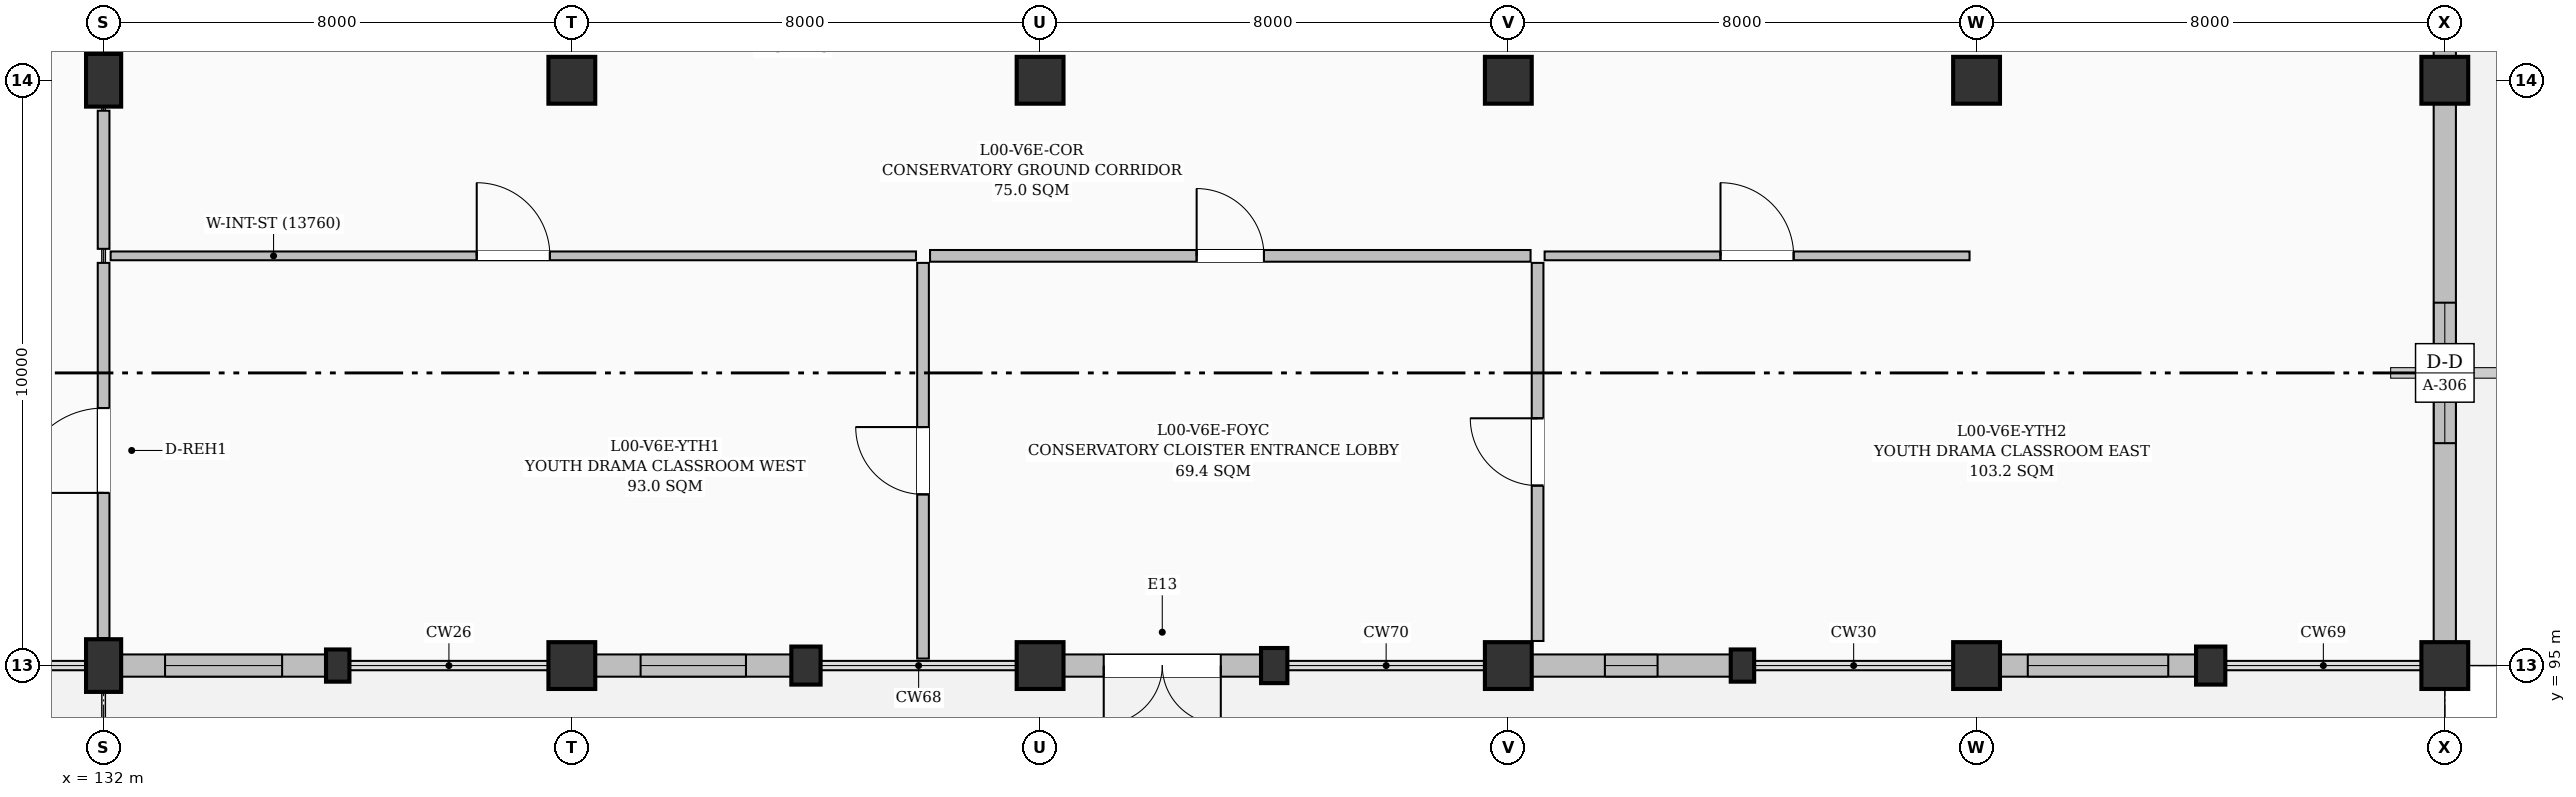
"""IFC4 building model, lengths in metres.
Left out: names, types, materials, properties, quantities, classifications, styles, units other than length and angle.
Written with IfcOpenShell. Run it as: python <this file> out.ifc"""

import sys

from ifc_helpers import new_model, si_unit, direction, frame, frame_2d, origin, origin_2d, place, context, subcontext, project, spatial, rectangle, extrude, element, fill, save


model = new_model("IFC4")
c1 = context("Model", 3, precision=1e-05, world=origin(), true_north=direction((0.0, 1.0)))
c2 = subcontext(c1, "Body", "Model", "MODEL_VIEW")
j1 = project(units=[si_unit("LENGTHUNIT", "METRE"), si_unit("PLANEANGLEUNIT", "RADIAN")], contexts=[c1])
p1 = place(None, origin())
s1 = spatial("IfcSite", under=j1, at=p1, CompositionType="ELEMENT")
p2 = place(p1, origin())
s2 = spatial("IfcBuilding", under=s1, at=p2, CompositionType="ELEMENT")
p3 = place(p2, origin())
s3 = spatial("IfcBuildingStorey", under=s2, at=p3, CompositionType="ELEMENT", Elevation=0.0)
for number, where, z_axis, x_axis in (
    (1, (132.0, 95.0, 0.0), (0.0, 0.0, 1.0), (1.0, 0.0, 0.0)),
    (2, (132.0, 105.0, 0.0), (0.0, 0.0, 1.0), (1.0, 0.0, 0.0)),
):
    element("IfcColumn", number, at=place(p3, frame(where, z_axis=z_axis, x_axis=x_axis)), inside=s3, PredefinedType="COLUMN", context=c2, shape_type="SweptSolid", body=[
        extrude(rectangle(XDim=0.6, YDim=0.9, at=origin_2d()), origin(), (0.0, 0.0, 1.0), 4.8),
    ])
p4 = place(p3, frame((136.0, 95.0, 0.0), z_axis=(0.0, 0.0, 1.0), x_axis=(1.0, 0.0, 0.0)))
e3 = element("IfcColumn", 3, at=p4, inside=s3, PredefinedType="PILASTER", context=c2, shape_type="SweptSolid", body=[
    extrude(rectangle(XDim=0.4, YDim=0.55, at=origin_2d()), origin(), (0.0, 0.0, 1.0), 4.8),
])
for number, where, z_axis, x_axis in (
    (4, (140.0, 95.0, 0.0), (0.0, 0.0, 1.0), (1.0, 0.0, 0.0)),
    (5, (140.0, 105.0, 0.0), (0.0, 0.0, 1.0), (1.0, 0.0, 0.0)),
):
    element("IfcColumn", number, at=place(p3, frame(where, z_axis=z_axis, x_axis=x_axis)), inside=s3, PredefinedType="COLUMN", context=c2, shape_type="SweptSolid", body=[
        extrude(rectangle(XDim=0.8, YDim=0.8, at=origin_2d()), origin(), (0.0, 0.0, 1.0), 4.8),
    ])
p5 = place(p3, frame((144.0, 95.0, 0.0), z_axis=(0.0, 0.0, 1.0), x_axis=(1.0, 0.0, 0.0)))
e6 = element("IfcColumn", 6, at=p5, inside=s3, PredefinedType="PILASTER", context=c2, shape_type="SweptSolid", body=[
    extrude(rectangle(XDim=0.5, YDim=0.65, at=origin_2d()), origin(), (0.0, 0.0, 1.0), 4.8),
])
for number, where, z_axis, x_axis in (
    (7, (148.0, 95.0, 0.0), (0.0, 0.0, 1.0), (1.0, 0.0, 0.0)),
    (8, (148.0, 105.0, 0.0), (0.0, 0.0, 1.0), (1.0, 0.0, 0.0)),
):
    element("IfcColumn", number, at=place(p3, frame(where, z_axis=z_axis, x_axis=x_axis)), inside=s3, PredefinedType="COLUMN", context=c2, shape_type="SweptSolid", body=[
        extrude(rectangle(XDim=0.8, YDim=0.8, at=origin_2d()), origin(), (0.0, 0.0, 1.0), 4.8),
    ])
p6 = place(p3, frame((152.0, 95.0, 0.0), z_axis=(0.0, 0.0, 1.0), x_axis=(1.0, 0.0, 0.0)))
e9 = element("IfcColumn", 9, at=p6, inside=s3, PredefinedType="PILASTER", context=c2, shape_type="SweptSolid", body=[
    extrude(rectangle(XDim=0.45, YDim=0.6, at=origin_2d()), origin(), (0.0, 0.0, 1.0), 4.8),
])
for number, where, z_axis, x_axis in (
    (10, (156.0, 95.0, 0.0), (0.0, 0.0, 1.0), (1.0, 0.0, 0.0)),
    (11, (156.0, 105.0, 0.0), (0.0, 0.0, 1.0), (1.0, 0.0, 0.0)),
):
    element("IfcColumn", number, at=place(p3, frame(where, z_axis=z_axis, x_axis=x_axis)), inside=s3, PredefinedType="COLUMN", context=c2, shape_type="SweptSolid", body=[
        extrude(rectangle(XDim=0.8, YDim=0.8, at=origin_2d()), origin(), (0.0, 0.0, 1.0), 4.8),
    ])
p7 = place(p3, frame((160.0, 95.0, 0.0), z_axis=(0.0, 0.0, 1.0), x_axis=(1.0, 0.0, 0.0)))
e12 = element("IfcColumn", 12, at=p7, inside=s3, PredefinedType="PILASTER", context=c2, shape_type="SweptSolid", body=[
    extrude(rectangle(XDim=0.4, YDim=0.55, at=origin_2d()), origin(), (0.0, 0.0, 1.0), 4.8),
])
for number, where, z_axis, x_axis in (
    (13, (164.0, 95.0, 0.0), (0.0, 0.0, 1.0), (1.0, 0.0, 0.0)),
    (14, (164.0, 105.0, 0.0), (0.0, 0.0, 1.0), (1.0, 0.0, 0.0)),
):
    element("IfcColumn", number, at=place(p3, frame(where, z_axis=z_axis, x_axis=x_axis)), inside=s3, PredefinedType="COLUMN", context=c2, shape_type="SweptSolid", body=[
        extrude(rectangle(XDim=0.8, YDim=0.8, at=origin_2d()), origin(), (0.0, 0.0, 1.0), 4.8),
    ])
p8 = place(p3, frame((168.0, 95.0, 0.0), z_axis=(0.0, 0.0, 1.0), x_axis=(1.0, 0.0, 0.0)))
e15 = element("IfcColumn", 15, at=p8, inside=s3, PredefinedType="PILASTER", context=c2, shape_type="SweptSolid", body=[
    extrude(rectangle(XDim=0.5, YDim=0.65, at=origin_2d()), origin(), (0.0, 0.0, 1.0), 4.8),
])
for number, where, z_axis, x_axis in (
    (16, (172.0, 95.0, 0.0), (0.0, 0.0, 1.0), (1.0, 0.0, 0.0)),
    (17, (172.0, 105.0, 0.0), (0.0, 0.0, 1.0), (1.0, 0.0, 0.0)),
):
    element("IfcColumn", number, at=place(p3, frame(where, z_axis=z_axis, x_axis=x_axis)), inside=s3, PredefinedType="COLUMN", context=c2, shape_type="SweptSolid", body=[
        extrude(rectangle(XDim=0.8, YDim=0.8, at=origin_2d()), origin(), (0.0, 0.0, 1.0), 4.8),
    ])
p9 = place(p3, frame((172.0, 114.6, 0.0), z_axis=(0.0, 0.0, 1.0), x_axis=(0.0, -1.0, 0.0)))
e18 = element("IfcWall", 18, at=p9, inside=s3, PredefinedType="SOLIDWALL", context=c2, shape_type="SweptSolid", body=[
    extrude(rectangle(XDim=9.2, YDim=0.38, at=frame_2d((4.6, 0.0))), origin(), (0.0, 0.0, 1.0), 4.335),
])
p10 = place(p9, frame((3.85, 0.0, 0.95)))
e19 = element("IfcOpeningElement", 19, at=p10, cuts=e18, PredefinedType="OPENING", context=c2, shape_type="SweptSolid", body=[
    extrude(rectangle(XDim=1.5, YDim=1.5, at=frame_2d((0.75, 0.75))), frame((0.0, 0.2, 0.0), z_axis=(0.0, -1.0, 0.0), x_axis=(1.0, 0.0, 0.0)), (0.0, 0.0, 1.0), 0.4),
])
p11 = place(p3, frame((172.0, 104.6, 0.0), z_axis=(0.0, 0.0, 1.0), x_axis=(0.0, -1.0, 0.0)))
e20 = element("IfcWall", 20, at=p11, inside=s3, PredefinedType="SOLIDWALL", context=c2, shape_type="SweptSolid", body=[
    extrude(rectangle(XDim=9.2, YDim=0.38, at=frame_2d((4.6, 0.0))), origin(), (0.0, 0.0, 1.0), 4.235),
])
p12 = place(p11, frame((3.4, 0.0, 0.95)))
e21 = element("IfcOpeningElement", 21, at=p12, cuts=e20, PredefinedType="OPENING", context=c2, shape_type="SweptSolid", body=[
    extrude(rectangle(XDim=2.4, YDim=1.5, at=frame_2d((1.2, 0.75))), frame((0.0, 0.2, 0.0), z_axis=(0.0, -1.0, 0.0), x_axis=(1.0, 0.0, 0.0)), (0.0, 0.0, 1.0), 0.4),
])
p13 = place(p3, frame((167.75, 95.0, 0.0), z_axis=(0.0, 0.0, 1.0), x_axis=(-1.0, 0.0, 0.0)))
e22 = element("IfcWall", 22, at=p13, inside=s3, PredefinedType="SOLIDWALL", context=c2, shape_type="SweptSolid", body=[
    extrude(rectangle(XDim=3.35, YDim=0.38, at=frame_2d((1.675, 0.0))), origin(), (0.0, 0.0, 1.0), 3.985),
])
p14 = place(p13, frame((0.475, 0.0, 0.95)))
e23 = element("IfcOpeningElement", 23, at=p14, cuts=e22, PredefinedType="OPENING", context=c2, shape_type="SweptSolid", body=[
    extrude(rectangle(XDim=2.4, YDim=1.5, at=frame_2d((1.2, 0.75))), frame((0.0, 0.2, 0.0), z_axis=(0.0, -1.0, 0.0), x_axis=(1.0, 0.0, 0.0)), (0.0, 0.0, 1.0), 0.4),
])
p15 = place(p3, frame((159.8, 95.0, 0.0), z_axis=(0.0, 0.0, 1.0), x_axis=(-1.0, 0.0, 0.0)))
e24 = element("IfcWall", 24, at=p15, inside=s3, PredefinedType="SOLIDWALL", context=c2, shape_type="SweptSolid", body=[
    extrude(rectangle(XDim=3.4, YDim=0.38, at=frame_2d((1.7, 0.0))), origin(), (0.0, 0.0, 1.0), 4.035),
])
p16 = place(p15, frame((1.25, 0.0, 0.95)))
e25 = element("IfcOpeningElement", 25, at=p16, cuts=e24, PredefinedType="OPENING", context=c2, shape_type="SweptSolid", body=[
    extrude(rectangle(XDim=0.9, YDim=1.8, at=frame_2d((0.45, 0.9))), frame((0.0, 0.2, 0.0), z_axis=(0.0, -1.0, 0.0), x_axis=(1.0, 0.0, 0.0)), (0.0, 0.0, 1.0), 0.4),
])
p17 = place(p3, frame((151.775, 95.0, 0.0), z_axis=(0.0, 0.0, 1.0), x_axis=(-1.0, 0.0, 0.0)))
e26 = element("IfcWall", 26, at=p17, inside=s3, PredefinedType="SOLIDWALL", context=c2, shape_type="SweptSolid", body=[
    extrude(rectangle(XDim=3.375, YDim=0.38, at=frame_2d((1.688, 0.0))), origin(), (0.0, 0.0, 1.0), 4.235),
])
p18 = place(p17, frame((0.688, 0.0, 0.0)))
e27 = element("IfcOpeningElement", 27, at=p18, cuts=e26, PredefinedType="OPENING", context=c2, shape_type="SweptSolid", body=[
    extrude(rectangle(XDim=2.0, YDim=2.3, at=frame_2d((1.0, 1.15))), frame((0.0, 0.2, 0.0), z_axis=(0.0, -1.0, 0.0), x_axis=(1.0, 0.0, 0.0)), (0.0, 0.0, 1.0), 0.4),
])
p19 = place(p3, frame((143.75, 95.0, 0.0), z_axis=(0.0, 0.0, 1.0), x_axis=(-1.0, 0.0, 0.0)))
e28 = element("IfcWall", 28, at=p19, inside=s3, PredefinedType="SOLIDWALL", context=c2, shape_type="SweptSolid", body=[
    extrude(rectangle(XDim=3.35, YDim=0.38, at=frame_2d((1.675, 0.0))), origin(), (0.0, 0.0, 1.0), 3.935),
])
p20 = place(p19, frame((0.775, 0.0, 0.95)))
e29 = element("IfcOpeningElement", 29, at=p20, cuts=e28, PredefinedType="OPENING", context=c2, shape_type="SweptSolid", body=[
    extrude(rectangle(XDim=1.8, YDim=1.5, at=frame_2d((0.9, 0.75))), frame((0.0, 0.2, 0.0), z_axis=(0.0, -1.0, 0.0), x_axis=(1.0, 0.0, 0.0)), (0.0, 0.0, 1.0), 0.4),
])
p21 = place(p3, frame((135.8, 95.0, 0.0), z_axis=(0.0, 0.0, 1.0), x_axis=(-1.0, 0.0, 0.0)))
e30 = element("IfcWall", 30, at=p21, inside=s3, PredefinedType="SOLIDWALL", context=c2, shape_type="SweptSolid", body=[
    extrude(rectangle(XDim=3.5, YDim=0.38, at=frame_2d((1.75, 0.0))), origin(), (0.0, 0.0, 1.0), 3.985),
])
p22 = place(p21, frame((0.75, 0.0, 0.95)))
e31 = element("IfcOpeningElement", 31, at=p22, cuts=e30, PredefinedType="OPENING", context=c2, shape_type="SweptSolid", body=[
    extrude(rectangle(XDim=2.0, YDim=1.2, at=frame_2d((1.0, 0.6))), frame((0.0, 0.2, 0.0), z_axis=(0.0, -1.0, 0.0), x_axis=(1.0, 0.0, 0.0)), (0.0, 0.0, 1.0), 0.4),
])
p23 = place(p3, frame((132.0, 95.47, 0.0), z_axis=(0.0, 0.0, 1.0), x_axis=(0.0, 1.0, 0.0)))
e32 = element("IfcWall", 32, at=p23, inside=s3, PredefinedType="PARTITIONING", context=c2, shape_type="SweptSolid", body=[
    extrude(rectangle(XDim=6.41, YDim=0.2, at=frame_2d((3.205, 0.0))), origin(), (0.0, 0.0, 1.0), 4.085),
])
p24 = place(p23, frame((2.48, 0.0, 0.0)))
e33 = element("IfcOpeningElement", 33, at=p24, cuts=e32, PredefinedType="OPENING", context=c2, shape_type="SweptSolid", body=[
    extrude(rectangle(XDim=1.45, YDim=2.25, at=frame_2d((0.725, 1.125))), frame((0.0, 0.11, 0.0), z_axis=(0.0, -1.0, 0.0), x_axis=(1.0, 0.0, 0.0)), (0.0, 0.0, 1.0), 0.22),
])
p25 = place(p3, frame((132.0, 102.12, 0.0), z_axis=(0.0, 0.0, 1.0), x_axis=(0.0, 1.0, 0.0)))
e34 = element("IfcWall", 34, at=p25, inside=s3, PredefinedType="PARTITIONING", context=c2, shape_type="SweptSolid", body=[
    extrude(rectangle(XDim=2.36, YDim=0.2, at=frame_2d((1.18, 0.0))), origin(), (0.0, 0.0, 1.0), 4.085),
])
p26 = place(p3, frame((132.12, 102.0, 0.0), z_axis=(0.0, 0.0, 1.0), x_axis=(1.0, 0.0, 0.0)))
e35 = element("IfcWall", 35, at=p26, inside=s3, PredefinedType="PARTITIONING", context=c2, shape_type="SweptSolid", body=[
    extrude(rectangle(XDim=13.76, YDim=0.15, at=frame_2d((6.88, 0.0))), origin(), (0.0, 0.0, 1.0), 4.175),
])
p27 = place(p26, frame((6.255, 0.0, 0.0)))
e36 = element("IfcOpeningElement", 36, at=p27, cuts=e35, PredefinedType="OPENING", context=c2, shape_type="SweptSolid", body=[
    extrude(rectangle(XDim=1.25, YDim=2.15, at=frame_2d((0.625, 1.075))), frame((0.0, 0.085, 0.0), z_axis=(0.0, -1.0, 0.0), x_axis=(1.0, 0.0, 0.0)), (0.0, 0.0, 1.0), 0.17),
])
p28 = place(p3, frame((146.0, 95.12, 0.0), z_axis=(0.0, 0.0, 1.0), x_axis=(0.0, 1.0, 0.0)))
e37 = element("IfcWall", 37, at=p28, inside=s3, PredefinedType="PARTITIONING", context=c2, shape_type="SweptSolid", body=[
    extrude(rectangle(XDim=6.76, YDim=0.2, at=frame_2d((3.38, 0.0))), origin(), (0.0, 0.0, 1.0), 4.55),
])
p29 = place(p28, frame((2.805, 0.0, 0.0)))
e38 = element("IfcOpeningElement", 38, at=p29, cuts=e37, PredefinedType="OPENING", context=c2, shape_type="SweptSolid", body=[
    extrude(rectangle(XDim=1.15, YDim=2.15, at=frame_2d((0.575, 1.075))), frame((0.0, 0.11, 0.0), z_axis=(0.0, -1.0, 0.0), x_axis=(1.0, 0.0, 0.0)), (0.0, 0.0, 1.0), 0.22),
])
p30 = place(p3, frame((156.62, 102.0, 0.0), z_axis=(0.0, 0.0, 1.0), x_axis=(1.0, 0.0, 0.0)))
e39 = element("IfcWall", 39, at=p30, inside=s3, PredefinedType="PARTITIONING", context=c2, shape_type="SweptSolid", body=[
    extrude(rectangle(XDim=7.26, YDim=0.15, at=frame_2d((3.63, 0.0))), origin(), (0.0, 0.0, 1.0), 4.205),
])
p31 = place(p30, frame((3.005, 0.0, 0.0)))
e40 = element("IfcOpeningElement", 40, at=p31, cuts=e39, PredefinedType="OPENING", context=c2, shape_type="SweptSolid", body=[
    extrude(rectangle(XDim=1.25, YDim=2.15, at=frame_2d((0.625, 1.075))), frame((0.0, 0.085, 0.0), z_axis=(0.0, -1.0, 0.0), x_axis=(1.0, 0.0, 0.0)), (0.0, 0.0, 1.0), 0.17),
])
p32 = place(p3, frame((156.5, 95.42, 0.0), z_axis=(0.0, 0.0, 1.0), x_axis=(0.0, 1.0, 0.0)))
e41 = element("IfcWall", 41, at=p32, inside=s3, PredefinedType="PARTITIONING", context=c2, shape_type="SweptSolid", body=[
    extrude(rectangle(XDim=6.46, YDim=0.2, at=frame_2d((3.23, 0.0))), origin(), (0.0, 0.0, 1.0), 4.55),
])
p33 = place(p32, frame((2.655, 0.0, 0.0)))
e42 = element("IfcOpeningElement", 42, at=p33, cuts=e41, PredefinedType="OPENING", context=c2, shape_type="SweptSolid", body=[
    extrude(rectangle(XDim=1.15, YDim=2.15, at=frame_2d((0.575, 1.075))), frame((0.0, 0.11, 0.0), z_axis=(0.0, -1.0, 0.0), x_axis=(1.0, 0.0, 0.0)), (0.0, 0.0, 1.0), 0.22),
])
p34 = place(p3, frame((146.12, 102.0, 0.0), z_axis=(0.0, 0.0, 1.0), x_axis=(1.0, 0.0, 0.0)))
e43 = element("IfcWall", 43, at=p34, inside=s3, PredefinedType="PARTITIONING", context=c2, shape_type="SweptSolid", body=[
    extrude(rectangle(XDim=10.26, YDim=0.2, at=frame_2d((5.13, 0.0))), origin(), (0.0, 0.0, 1.0), 4.175),
])
p35 = place(p34, frame((4.555, 0.0, 0.0)))
e44 = element("IfcOpeningElement", 44, at=p35, cuts=e43, PredefinedType="OPENING", context=c2, shape_type="SweptSolid", body=[
    extrude(rectangle(XDim=1.15, YDim=2.15, at=frame_2d((0.575, 1.075))), frame((0.0, 0.11, 0.0), z_axis=(0.0, -1.0, 0.0), x_axis=(1.0, 0.0, 0.0)), (0.0, 0.0, 1.0), 0.22),
])
p36 = place(p12, origin())
e45 = element("IfcWindow", 45, at=p36, inside=s3, PartitioningType="TRIPLE_PANEL_VERTICAL", PredefinedType="WINDOW", context=c2, shape_type="SweptSolid", body=[
    extrude(rectangle(XDim=2.4, YDim=1.5, at=frame_2d((1.2, 0.75))), frame((0.0, 0.03, 0.0), z_axis=(0.0, -1.0, 0.0), x_axis=(1.0, 0.0, 0.0)), (0.0, 0.0, 1.0), 0.06),
])
fill(e21, e45)
p37 = place(p14, origin())
e46 = element("IfcWindow", 46, at=p37, inside=s3, PartitioningType="TRIPLE_PANEL_VERTICAL", PredefinedType="WINDOW", context=c2, shape_type="SweptSolid", body=[
    extrude(rectangle(XDim=2.4, YDim=1.5, at=frame_2d((1.2, 0.75))), frame((0.0, 0.03, 0.0), z_axis=(0.0, -1.0, 0.0), x_axis=(1.0, 0.0, 0.0)), (0.0, 0.0, 1.0), 0.06),
])
fill(e23, e46)
p38 = place(p16, origin())
e47 = element("IfcWindow", 47, at=p38, inside=s3, PartitioningType="SINGLE_PANEL", PredefinedType="WINDOW", context=c2, shape_type="SweptSolid", body=[
    extrude(rectangle(XDim=0.9, YDim=1.8, at=frame_2d((0.45, 0.9))), frame((0.0, 0.03, 0.0), z_axis=(0.0, -1.0, 0.0), x_axis=(1.0, 0.0, 0.0)), (0.0, 0.0, 1.0), 0.06),
])
fill(e25, e47)
p39 = place(p18, origin())
e48 = element("IfcDoor", 48, at=p39, inside=s3, OperationType="DOUBLE_DOOR_SINGLE_SWING", PredefinedType="DOOR", context=c2, shape_type="SweptSolid", body=[
    extrude(rectangle(XDim=2.0, YDim=2.3, at=frame_2d((1.0, 1.15))), frame((0.0, 0.025, 0.0), z_axis=(0.0, -1.0, 0.0), x_axis=(1.0, 0.0, 0.0)), (0.0, 0.0, 1.0), 0.05),
])
fill(e27, e48)
p40 = place(p20, origin())
e49 = element("IfcWindow", 49, at=p40, inside=s3, PartitioningType="DOUBLE_PANEL_VERTICAL", PredefinedType="WINDOW", context=c2, shape_type="SweptSolid", body=[
    extrude(rectangle(XDim=1.8, YDim=1.5, at=frame_2d((0.9, 0.75))), frame((0.0, 0.03, 0.0), z_axis=(0.0, -1.0, 0.0), x_axis=(1.0, 0.0, 0.0)), (0.0, 0.0, 1.0), 0.06),
])
fill(e29, e49)
p41 = place(p22, origin())
e50 = element("IfcWindow", 50, at=p41, inside=s3, PartitioningType="DOUBLE_PANEL_HORIZONTAL", PredefinedType="WINDOW", context=c2, shape_type="SweptSolid", body=[
    extrude(rectangle(XDim=2.0, YDim=1.2, at=frame_2d((1.0, 0.6))), frame((0.0, 0.03, 0.0), z_axis=(0.0, -1.0, 0.0), x_axis=(1.0, 0.0, 0.0)), (0.0, 0.0, 1.0), 0.06),
])
fill(e31, e50)
p42 = place(p24, origin())
e51 = element("IfcDoor", 51, at=p42, inside=s3, OperationType="SINGLE_SWING_LEFT", PredefinedType="DOOR", context=c2, shape_type="SweptSolid", body=[
    extrude(rectangle(XDim=1.45, YDim=2.25, at=frame_2d((0.725, 1.125))), frame((0.0, 0.025, 0.0), z_axis=(0.0, -1.0, 0.0), x_axis=(1.0, 0.0, 0.0)), (0.0, 0.0, 1.0), 0.05),
])
fill(e33, e51)
p43 = place(p27, origin())
e52 = element("IfcDoor", 52, at=p43, inside=s3, OperationType="SINGLE_SWING_LEFT", PredefinedType="DOOR", context=c2, shape_type="SweptSolid", body=[
    extrude(rectangle(XDim=1.25, YDim=2.15, at=frame_2d((0.625, 1.075))), frame((0.0, 0.025, 0.0), z_axis=(0.0, -1.0, 0.0), x_axis=(1.0, 0.0, 0.0)), (0.0, 0.0, 1.0), 0.05),
])
fill(e36, e52)
p44 = place(p29, origin())
e53 = element("IfcDoor", 53, at=p44, inside=s3, OperationType="SINGLE_SWING_RIGHT", PredefinedType="DOOR", context=c2, shape_type="SweptSolid", body=[
    extrude(rectangle(XDim=1.15, YDim=2.15, at=frame_2d((0.575, 1.075))), frame((0.0, 0.025, 0.0), z_axis=(0.0, -1.0, 0.0), x_axis=(1.0, 0.0, 0.0)), (0.0, 0.0, 1.0), 0.05),
])
fill(e38, e53)
p45 = place(p31, origin())
e54 = element("IfcDoor", 54, at=p45, inside=s3, OperationType="SINGLE_SWING_LEFT", PredefinedType="DOOR", context=c2, shape_type="SweptSolid", body=[
    extrude(rectangle(XDim=1.25, YDim=2.15, at=frame_2d((0.625, 1.075))), frame((0.0, 0.025, 0.0), z_axis=(0.0, -1.0, 0.0), x_axis=(1.0, 0.0, 0.0)), (0.0, 0.0, 1.0), 0.05),
])
fill(e40, e54)
p46 = place(p33, origin())
e55 = element("IfcDoor", 55, at=p46, inside=s3, OperationType="SINGLE_SWING_RIGHT", PredefinedType="DOOR", context=c2, shape_type="SweptSolid", body=[
    extrude(rectangle(XDim=1.15, YDim=2.15, at=frame_2d((0.575, 1.075))), frame((0.0, 0.025, 0.0), z_axis=(0.0, -1.0, 0.0), x_axis=(1.0, 0.0, 0.0)), (0.0, 0.0, 1.0), 0.05),
])
fill(e42, e55)
p47 = place(p35, origin())
e56 = element("IfcDoor", 56, at=p47, inside=s3, OperationType="SINGLE_SWING_LEFT", PredefinedType="DOOR", context=c2, shape_type="SweptSolid", body=[
    extrude(rectangle(XDim=1.15, YDim=2.15, at=frame_2d((0.575, 1.075))), frame((0.0, 0.025, 0.0), z_axis=(0.0, -1.0, 0.0), x_axis=(1.0, 0.0, 0.0)), (0.0, 0.0, 1.0), 0.05),
])
fill(e44, e56)
save(model, sys.argv[1])
